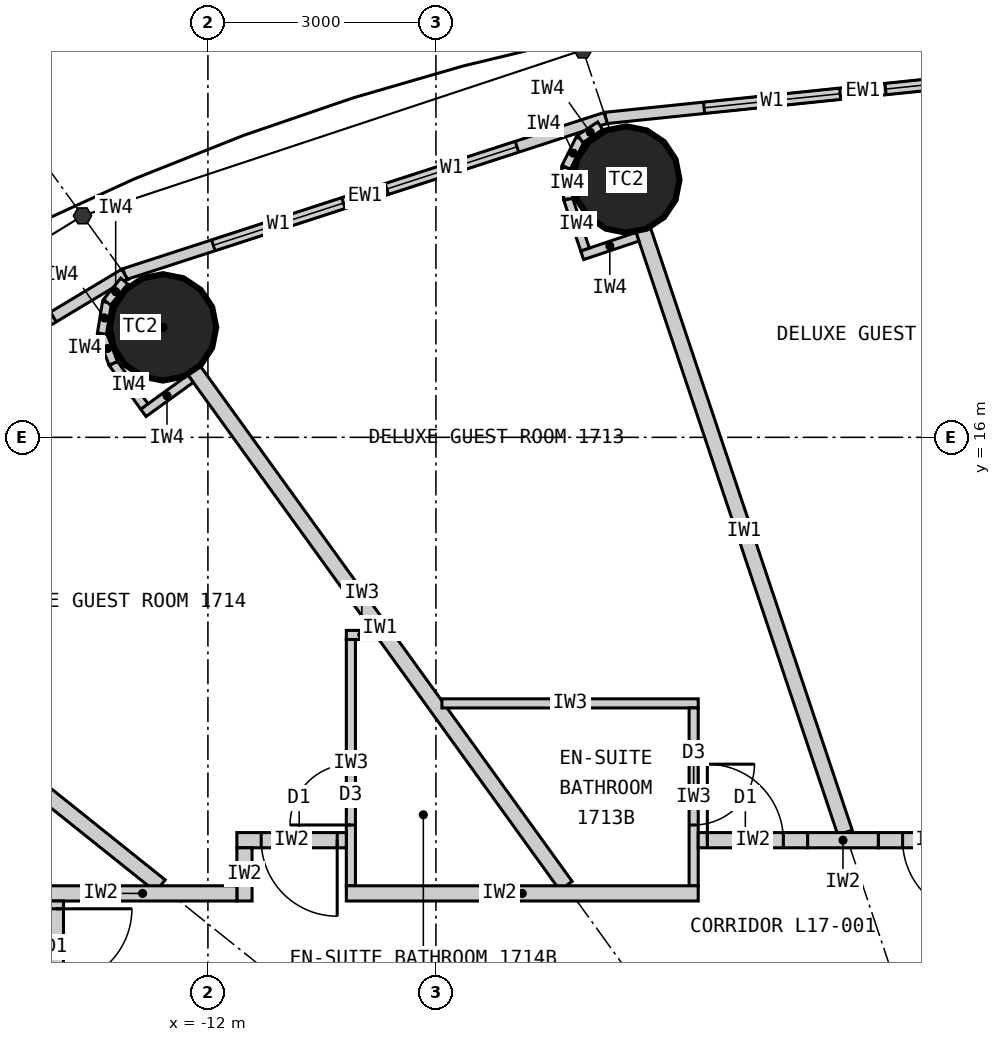
"""IFC4 building model, lengths in metres.
Left out: names, types, materials, properties, quantities, classifications, styles, units other than length and angle.
Written with IfcOpenShell. Run it as: python <this file> out.ifc"""

import sys

from ifc_helpers import new_model, si_unit, direction, frame, frame_2d, origin, origin_2d, place, context, subcontext, project, spatial, rectangle, circle, extrude, element, fill, save


model = new_model("IFC4")
c1 = context("Model", 3, precision=1e-05, world=origin(), true_north=direction((0.0, 1.0)))
c2 = subcontext(c1, "Body", "Model", "MODEL_VIEW")
j1 = project(units=[si_unit("LENGTHUNIT", "METRE"), si_unit("PLANEANGLEUNIT", "RADIAN")], contexts=[c1])
p1 = place(None, origin())
s1 = spatial("IfcSite", under=j1, at=p1, CompositionType="ELEMENT")
p2 = place(p1, origin())
s2 = spatial("IfcBuilding", under=s1, at=p2, CompositionType="ELEMENT")
p3 = place(p2, frame((0.0, 0.0, 70.5)))
s3 = spatial("IfcBuildingStorey", under=s2, at=p3, CompositionType="ELEMENT", Elevation=70.5)
for number, where, z_axis, x_axis in (
    (1, (-6.495, 19.391, 0.0), (0.0, 0.0, 1.0), (1.0, 0.0, 0.0)),
    (2, (-12.591, 17.447, 0.0), (0.0, 0.0, 1.0), (1.0, 0.0, 0.0)),
):
    element("IfcColumn", number, at=place(p3, frame(where, z_axis=z_axis, x_axis=x_axis)), inside=s3, PredefinedType="COLUMN", context=c2, shape_type="SweptSolid", body=[
        extrude(circle(Radius=0.7, at=origin_2d()), origin(), (0.0, 0.0, 1.0), 3.3),
    ])
p4 = place(p3, frame((0.0, 20.9, 0.0), z_axis=(0.0, 0.0, 1.0), x_axis=(-0.994721394369, -0.102612609291, 0.0)))
e3 = element("IfcWall", 3, at=p4, inside=s3, PredefinedType="ELEMENTEDWALL", context=c2, shape_type="SweptSolid", body=[
    extrude(rectangle(XDim=6.802, YDim=0.15, at=frame_2d((3.401, 0.0))), origin(), (0.0, 0.0, 1.0), 3.12),
])
p5 = place(p4, frame((1.301, 0.0, 0.9)))
e4 = element("IfcOpeningElement", 4, at=p5, cuts=e3, PredefinedType="OPENING", context=c2, shape_type="SweptSolid", body=[
    extrude(rectangle(XDim=1.8, YDim=1.9, at=frame_2d((0.9, 0.95))), frame((0.0, 0.085, 0.0), z_axis=(0.0, -1.0, 0.0), x_axis=(1.0, 0.0, 0.0)), (0.0, 0.0, 1.0), 0.17),
])
p6 = place(p4, frame((3.701, 0.0, 0.9)))
e5 = element("IfcOpeningElement", 5, at=p6, cuts=e3, PredefinedType="OPENING", context=c2, shape_type="SweptSolid", body=[
    extrude(rectangle(XDim=1.8, YDim=1.9, at=frame_2d((0.9, 0.95))), frame((0.0, 0.085, 0.0), z_axis=(0.0, -1.0, 0.0), x_axis=(1.0, 0.0, 0.0)), (0.0, 0.0, 1.0), 0.17),
])
p7 = place(p3, frame((-6.766, 20.202, 0.0), z_axis=(0.0, 0.0, 1.0), x_axis=(-0.951137534625, -0.308767534285, 0.0)))
e6 = element("IfcWall", 6, at=p7, inside=s3, PredefinedType="ELEMENTEDWALL", context=c2, shape_type="SweptSolid", body=[
    extrude(rectangle(XDim=6.655, YDim=0.15, at=frame_2d((3.328, 0.0))), origin(), (0.0, 0.0, 1.0), 3.12),
])
p8 = place(p7, frame((1.228, 0.0, 0.9)))
e7 = element("IfcOpeningElement", 7, at=p8, cuts=e6, PredefinedType="OPENING", context=c2, shape_type="SweptSolid", body=[
    extrude(rectangle(XDim=1.8, YDim=1.9, at=frame_2d((0.9, 0.95))), frame((0.0, 0.085, 0.0), z_axis=(0.0, -1.0, 0.0), x_axis=(1.0, 0.0, 0.0)), (0.0, 0.0, 1.0), 0.17),
])
p9 = place(p7, frame((3.628, 0.0, 0.9)))
e8 = element("IfcOpeningElement", 8, at=p9, cuts=e6, PredefinedType="OPENING", context=c2, shape_type="SweptSolid", body=[
    extrude(rectangle(XDim=1.8, YDim=1.9, at=frame_2d((0.9, 0.95))), frame((0.0, 0.085, 0.0), z_axis=(0.0, -1.0, 0.0), x_axis=(1.0, 0.0, 0.0)), (0.0, 0.0, 1.0), 0.17),
])
p10 = place(p3, frame((-13.096, 18.147, 0.0), z_axis=(0.0, 0.0, 1.0), x_axis=(-0.856983180864, -0.515344377787, 0.0)))
e9 = element("IfcWall", 9, at=p10, inside=s3, PredefinedType="ELEMENTEDWALL", context=c2, shape_type="SweptSolid", body=[
    extrude(rectangle(XDim=6.386, YDim=0.15, at=frame_2d((3.193, 0.0))), origin(), (0.0, 0.0, 1.0), 3.12),
])
p11 = place(p10, frame((1.093, 0.0, 0.9)))
e10 = element("IfcOpeningElement", 10, at=p11, cuts=e9, PredefinedType="OPENING", context=c2, shape_type="SweptSolid", body=[
    extrude(rectangle(XDim=1.8, YDim=1.9, at=frame_2d((0.9, 0.95))), frame((0.0, 0.085, 0.0), z_axis=(0.0, -1.0, 0.0), x_axis=(1.0, 0.0, 0.0)), (0.0, 0.0, 1.0), 0.17),
])
p12 = place(p10, frame((3.493, 0.0, 0.9)))
e11 = element("IfcOpeningElement", 11, at=p12, cuts=e9, PredefinedType="OPENING", context=c2, shape_type="SweptSolid", body=[
    extrude(rectangle(XDim=1.8, YDim=1.9, at=frame_2d((0.9, 0.95))), frame((0.0, 0.085, 0.0), z_axis=(0.0, -1.0, 0.0), x_axis=(1.0, 0.0, 0.0)), (0.0, 0.0, 1.0), 0.17),
])
p13 = place(p3, frame((-3.617, 10.8, 0.0), z_axis=(0.0, 0.0, 1.0), x_axis=(-0.317576599239, 0.948232621046, 0.0)))
e12 = element("IfcWall", 12, at=p13, inside=s3, PredefinedType="PARTITIONING", context=c2, shape_type="SweptSolid", body=[
    extrude(rectangle(XDim=8.36, YDim=0.2, at=frame_2d((4.18, 0.0))), origin(), (0.0, 0.0, 1.0), 2.32),
])
p14 = place(p3, frame((-7.289, 10.1, 0.0), z_axis=(0.0, 0.0, 1.0), x_axis=(-0.585198353053, 0.810890182197, 0.0)))
e13 = element("IfcWall", 13, at=p14, inside=s3, PredefinedType="PARTITIONING", context=c2, shape_type="SweptSolid", body=[
    extrude(rectangle(XDim=8.36, YDim=0.2, at=frame_2d((4.18, 0.0))), origin(), (0.0, 0.0, 1.0), 2.32),
])
p15 = place(p3, frame((-12.625, 10.1, 0.0), z_axis=(0.0, 0.0, 1.0), x_axis=(-0.780892451574, 0.624665493744, 0.0)))
e14 = element("IfcWall", 14, at=p15, inside=s3, PredefinedType="PARTITIONING", context=c2, shape_type="SweptSolid", body=[
    extrude(rectangle(XDim=6.045, YDim=0.2, at=frame_2d((3.022, 0.0))), origin(), (0.0, 0.0, 1.0), 2.32),
])
p16 = place(p3, frame((-8.921, 12.5, 0.0), z_axis=(0.0, 0.0, 1.0), x_axis=(1.0, 0.0, 0.0)))
e15 = element("IfcWall", 15, at=p16, inside=s3, PredefinedType="PARTITIONING", context=c2, shape_type="SweptSolid", body=[
    extrude(rectangle(XDim=3.372, YDim=0.12, at=frame_2d((1.686, 0.0))), origin(), (0.0, 0.0, 1.0), 3.12),
])
p17 = place(p3, frame((-5.609, 10.1, 0.0), z_axis=(0.0, 0.0, 1.0), x_axis=(0.0, 1.0, 0.0)))
e16 = element("IfcWall", 16, at=p17, inside=s3, PredefinedType="PARTITIONING", context=c2, shape_type="SweptSolid", body=[
    extrude(rectangle(XDim=2.34, YDim=0.12, at=frame_2d((1.17, 0.0))), origin(), (0.0, 0.0, 1.0), 3.12),
])
p18 = place(p17, frame((0.8, 0.0, 0.0)))
e17 = element("IfcOpeningElement", 17, at=p18, cuts=e16, PredefinedType="OPENING", context=c2, shape_type="SweptSolid", body=[
    extrude(rectangle(XDim=0.8, YDim=2.1, at=frame_2d((0.4, 1.05))), frame((0.0, 0.07, 0.0), z_axis=(0.0, -1.0, 0.0), x_axis=(1.0, 0.0, 0.0)), (0.0, 0.0, 1.0), 0.14),
])
p19 = place(p3, frame((-9.771, 13.4, 0.0), z_axis=(0.0, 0.0, 1.0), x_axis=(-1.0, 0.0, 0.0)))
e18 = element("IfcWall", 18, at=p19, inside=s3, PredefinedType="PARTITIONING", context=c2, shape_type="SweptSolid", body=[
    extrude(rectangle(XDim=0.408, YDim=0.12, at=frame_2d((0.204, 0.0))), origin(), (0.0, 0.0, 1.0), 3.12),
])
p20 = place(p3, frame((-10.119, 10.1, 0.0), z_axis=(0.0, 0.0, 1.0), x_axis=(0.0, 1.0, 0.0)))
e19 = element("IfcWall", 19, at=p20, inside=s3, PredefinedType="PARTITIONING", context=c2, shape_type="SweptSolid", body=[
    extrude(rectangle(XDim=3.24, YDim=0.12, at=frame_2d((1.62, 0.0))), origin(), (0.0, 0.0, 1.0), 3.12),
])
p21 = place(p20, frame((0.8, 0.0, 0.0)))
e20 = element("IfcOpeningElement", 20, at=p21, cuts=e19, PredefinedType="OPENING", context=c2, shape_type="SweptSolid", body=[
    extrude(rectangle(XDim=0.8, YDim=2.1, at=frame_2d((0.4, 1.05))), frame((0.0, 0.07, 0.0), z_axis=(0.0, -1.0, 0.0), x_axis=(1.0, 0.0, 0.0)), (0.0, 0.0, 1.0), 0.14),
])
p22 = place(p3, frame((-3.18, 10.7, 0.0), z_axis=(0.0, 0.0, 1.0), x_axis=(1.0, 0.0, 0.0)))
e21 = element("IfcWall", 21, at=p22, inside=s3, PredefinedType="PARTITIONING", context=c2, shape_type="SweptSolid", body=[
    extrude(rectangle(XDim=1.44, YDim=0.2, at=frame_2d((0.72, 0.0))), origin(), (0.0, 0.0, 1.0), 3.12),
])
p23 = place(p22, frame((0.32, 0.0, 0.0)))
e22 = element("IfcOpeningElement", 22, at=p23, cuts=e21, PredefinedType="OPENING", context=c2, shape_type="SweptSolid", body=[
    extrude(rectangle(XDim=1.0, YDim=2.2, at=frame_2d((0.5, 1.1))), frame((0.0, 0.11, 0.0), z_axis=(0.0, -1.0, 0.0), x_axis=(1.0, 0.0, 0.0)), (0.0, 0.0, 1.0), 0.22),
])
p24 = place(p3, frame((-5.549, 10.7, 0.0), z_axis=(0.0, 0.0, 1.0), x_axis=(1.0, 0.0, 0.0)))
e23 = element("IfcWall", 23, at=p24, inside=s3, PredefinedType="PARTITIONING", context=c2, shape_type="SweptSolid", body=[
    extrude(rectangle(XDim=1.44, YDim=0.2, at=frame_2d((0.72, 0.0))), origin(), (0.0, 0.0, 1.0), 3.12),
])
p25 = place(p24, frame((0.12, 0.0, 0.0)))
e24 = element("IfcOpeningElement", 24, at=p25, cuts=e23, PredefinedType="OPENING", context=c2, shape_type="SweptSolid", body=[
    extrude(rectangle(XDim=1.0, YDim=2.2, at=frame_2d((0.5, 1.1))), frame((0.0, 0.11, 0.0), z_axis=(0.0, -1.0, 0.0), x_axis=(1.0, 0.0, 0.0)), (0.0, 0.0, 1.0), 0.22),
])
p26 = place(p3, frame((-11.619, 10.7, 0.0), z_axis=(0.0, 0.0, 1.0), x_axis=(1.0, 0.0, 0.0)))
e25 = element("IfcWall", 25, at=p26, inside=s3, PredefinedType="PARTITIONING", context=c2, shape_type="SweptSolid", body=[
    extrude(rectangle(XDim=1.44, YDim=0.2, at=frame_2d((0.72, 0.0))), origin(), (0.0, 0.0, 1.0), 3.12),
])
p27 = place(p26, frame((0.32, 0.0, 0.0)))
e26 = element("IfcOpeningElement", 26, at=p27, cuts=e25, PredefinedType="OPENING", context=c2, shape_type="SweptSolid", body=[
    extrude(rectangle(XDim=1.0, YDim=2.2, at=frame_2d((0.5, 1.1))), frame((0.0, 0.11, 0.0), z_axis=(0.0, -1.0, 0.0), x_axis=(1.0, 0.0, 0.0)), (0.0, 0.0, 1.0), 0.22),
])
p28 = place(p3, frame((-11.519, 9.9, 0.0), z_axis=(0.0, 0.0, 1.0), x_axis=(0.0, 1.0, 0.0)))
e27 = element("IfcWall", 27, at=p28, inside=s3, PredefinedType="PARTITIONING", context=c2, shape_type="SweptSolid", body=[
    extrude(rectangle(XDim=0.7, YDim=0.2, at=frame_2d((0.35, 0.0))), origin(), (0.0, 0.0, 1.0), 3.12),
])
p29 = place(p3, frame((-4.109, 10.7, 0.0), z_axis=(0.0, 0.0, 1.0), x_axis=(1.0, 0.0, 0.0)))
e28 = element("IfcWall", 28, at=p29, inside=s3, PredefinedType="PARTITIONING", context=c2, shape_type="SweptSolid", body=[
    extrude(rectangle(XDim=0.929, YDim=0.2, at=frame_2d((0.465, 0.0))), origin(), (0.0, 0.0, 1.0), 3.12),
])
p30 = place(p3, frame((-14.1, 10.0, 0.0), z_axis=(0.0, 0.0, 1.0), x_axis=(1.0, 0.0, 0.0)))
e29 = element("IfcWall", 29, at=p30, inside=s3, PredefinedType="PARTITIONING", context=c2, shape_type="SweptSolid", body=[
    extrude(rectangle(XDim=2.481, YDim=0.2, at=frame_2d((1.24, 0.0))), origin(), (0.0, 0.0, 1.0), 3.12),
])
p31 = place(p3, frame((-10.179, 10.0, 0.0), z_axis=(0.0, 0.0, 1.0), x_axis=(1.0, 0.0, 0.0)))
e30 = element("IfcWall", 30, at=p31, inside=s3, PredefinedType="PARTITIONING", context=c2, shape_type="SweptSolid", body=[
    extrude(rectangle(XDim=4.63, YDim=0.2, at=frame_2d((2.315, 0.0))), origin(), (0.0, 0.0, 1.0), 3.12),
])
p32 = place(p3, frame((-14.0, 9.9, 0.0), z_axis=(0.0, 0.0, 1.0), x_axis=(0.0, -1.0, 0.0)))
e31 = element("IfcWall", 31, at=p32, inside=s3, PredefinedType="PARTITIONING", context=c2, shape_type="SweptSolid", body=[
    extrude(rectangle(XDim=5.127, YDim=0.2, at=frame_2d((2.564, 0.0))), origin(), (0.0, 0.0, 1.0), 3.12),
])
p33 = place(p32, frame((0.103, 0.0, 0.0)))
e32 = element("IfcOpeningElement", 32, at=p33, cuts=e31, PredefinedType="OPENING", context=c2, shape_type="SweptSolid", body=[
    extrude(rectangle(XDim=1.0, YDim=2.2, at=frame_2d((0.5, 1.1))), frame((0.0, 0.11, 0.0), z_axis=(0.0, -1.0, 0.0), x_axis=(1.0, 0.0, 0.0)), (0.0, 0.0, 1.0), 0.22),
])
p34 = place(p3, frame((-6.348, 18.639, 0.0), z_axis=(0.0, 0.0, 1.0), x_axis=(-0.948268951266, -0.317468102437, 0.0)))
e33 = element("IfcWall", 33, at=p34, inside=s3, PredefinedType="PARTITIONING", context=c2, shape_type="SweptSolid", body=[
    extrude(rectangle(XDim=0.768, YDim=0.12, at=frame_2d((0.384, 0.0))), origin(), (0.0, 0.0, 1.0), 3.12),
])
p35 = place(p3, frame((-7.038, 18.471, 0.0), z_axis=(0.0, 0.0, 1.0), x_axis=(-0.317378466199, 0.9482989556, 0.0)))
e34 = element("IfcWall", 34, at=p35, inside=s3, PredefinedType="PARTITIONING", context=c2, shape_type="SweptSolid", body=[
    extrude(rectangle(XDim=0.7, YDim=0.12, at=frame_2d((0.35, 0.0))), origin(), (0.0, 0.0, 1.0), 3.12),
])
p36 = place(p3, frame((-7.26, 19.135, 0.0), z_axis=(0.0, 0.0, 1.0), x_axis=(-0.0613238046, 0.99811792439, 0.0)))
e35 = element("IfcWall", 35, at=p36, inside=s3, PredefinedType="PARTITIONING", context=c2, shape_type="SweptSolid", body=[
    extrude(rectangle(XDim=0.418, YDim=0.12, at=frame_2d((0.209, 0.0))), origin(), (0.0, 0.0, 1.0), 3.12),
])
p37 = place(p3, frame((-7.286, 19.552, 0.0), z_axis=(0.0, 0.0, 1.0), x_axis=(0.445810757773, 0.89512723579, 0.0)))
e36 = element("IfcWall", 36, at=p37, inside=s3, PredefinedType="PARTITIONING", context=c2, shape_type="SweptSolid", body=[
    extrude(rectangle(XDim=0.418, YDim=0.12, at=frame_2d((0.209, 0.0))), origin(), (0.0, 0.0, 1.0), 3.12),
])
p38 = place(p3, frame((-7.1, 19.926, 0.0), z_axis=(0.0, 0.0, 1.0), x_axis=(0.833488262509, 0.552537162787, 0.0)))
e37 = element("IfcWall", 37, at=p38, inside=s3, PredefinedType="PARTITIONING", context=c2, shape_type="SweptSolid", body=[
    extrude(rectangle(XDim=0.313, YDim=0.12, at=frame_2d((0.156, 0.0))), origin(), (0.0, 0.0, 1.0), 3.12),
])
p39 = place(p3, frame((-12.227, 16.772, 0.0), z_axis=(0.0, 0.0, 1.0), x_axis=(-0.810821798253, -0.585293098778, 0.0)))
e38 = element("IfcWall", 38, at=p39, inside=s3, PredefinedType="PARTITIONING", context=c2, shape_type="SweptSolid", body=[
    extrude(rectangle(XDim=0.768, YDim=0.12, at=frame_2d((0.384, 0.0))), origin(), (0.0, 0.0, 1.0), 3.12),
])
p40 = place(p3, frame((-12.836, 16.406, 0.0), z_axis=(0.0, 0.0, 1.0), x_axis=(-0.585223113993, 0.810872312296, 0.0)))
e39 = element("IfcWall", 39, at=p40, inside=s3, PredefinedType="PARTITIONING", context=c2, shape_type="SweptSolid", body=[
    extrude(rectangle(XDim=0.7, YDim=0.12, at=frame_2d((0.35, 0.0))), origin(), (0.0, 0.0, 1.0), 3.12),
])
p41 = place(p3, frame((-13.246, 16.974, 0.0), z_axis=(0.0, 0.0, 1.0), x_axis=(-0.355728122235, 0.934589483705, 0.0)))
e40 = element("IfcWall", 40, at=p41, inside=s3, PredefinedType="PARTITIONING", context=c2, shape_type="SweptSolid", body=[
    extrude(rectangle(XDim=0.418, YDim=0.12, at=frame_2d((0.209, 0.0))), origin(), (0.0, 0.0, 1.0), 3.12),
])
p42 = place(p3, frame((-13.394, 17.365, 0.0), z_axis=(0.0, 0.0, 1.0), x_axis=(0.159379276926, 0.987217425943, 0.0)))
e41 = element("IfcWall", 41, at=p42, inside=s3, PredefinedType="PARTITIONING", context=c2, shape_type="SweptSolid", body=[
    extrude(rectangle(XDim=0.418, YDim=0.12, at=frame_2d((0.209, 0.0))), origin(), (0.0, 0.0, 1.0), 3.12),
])
p43 = place(p3, frame((-13.328, 17.777, 0.0), z_axis=(0.0, 0.0, 1.0), x_axis=(0.632276783541, 0.774742582407, 0.0)))
e42 = element("IfcWall", 42, at=p43, inside=s3, PredefinedType="PARTITIONING", context=c2, shape_type="SweptSolid", body=[
    extrude(rectangle(XDim=0.36, YDim=0.12, at=frame_2d((0.18, 0.0))), origin(), (0.0, 0.0, 1.0), 3.12),
])
p44 = place(p5, origin())
e43 = element("IfcWindow", 43, at=p44, inside=s3, PartitioningType="SINGLE_PANEL", PredefinedType="WINDOW", context=c2, shape_type="SweptSolid", body=[
    extrude(rectangle(XDim=1.8, YDim=1.9, at=frame_2d((0.9, 0.95))), frame((0.0, 0.03, 0.0), z_axis=(0.0, -1.0, 0.0), x_axis=(1.0, 0.0, 0.0)), (0.0, 0.0, 1.0), 0.06),
])
fill(e4, e43)
p45 = place(p6, origin())
e44 = element("IfcWindow", 44, at=p45, inside=s3, PartitioningType="SINGLE_PANEL", PredefinedType="WINDOW", context=c2, shape_type="SweptSolid", body=[
    extrude(rectangle(XDim=1.8, YDim=1.9, at=frame_2d((0.9, 0.95))), frame((0.0, 0.03, 0.0), z_axis=(0.0, -1.0, 0.0), x_axis=(1.0, 0.0, 0.0)), (0.0, 0.0, 1.0), 0.06),
])
fill(e5, e44)
p46 = place(p8, origin())
e45 = element("IfcWindow", 45, at=p46, inside=s3, PartitioningType="SINGLE_PANEL", PredefinedType="WINDOW", context=c2, shape_type="SweptSolid", body=[
    extrude(rectangle(XDim=1.8, YDim=1.9, at=frame_2d((0.9, 0.95))), frame((0.0, 0.03, 0.0), z_axis=(0.0, -1.0, 0.0), x_axis=(1.0, 0.0, 0.0)), (0.0, 0.0, 1.0), 0.06),
])
fill(e7, e45)
p47 = place(p9, origin())
e46 = element("IfcWindow", 46, at=p47, inside=s3, PartitioningType="SINGLE_PANEL", PredefinedType="WINDOW", context=c2, shape_type="SweptSolid", body=[
    extrude(rectangle(XDim=1.8, YDim=1.9, at=frame_2d((0.9, 0.95))), frame((0.0, 0.03, 0.0), z_axis=(0.0, -1.0, 0.0), x_axis=(1.0, 0.0, 0.0)), (0.0, 0.0, 1.0), 0.06),
])
fill(e8, e46)
p48 = place(p11, origin())
e47 = element("IfcWindow", 47, at=p48, inside=s3, PartitioningType="SINGLE_PANEL", PredefinedType="WINDOW", context=c2, shape_type="SweptSolid", body=[
    extrude(rectangle(XDim=1.8, YDim=1.9, at=frame_2d((0.9, 0.95))), frame((0.0, 0.03, 0.0), z_axis=(0.0, -1.0, 0.0), x_axis=(1.0, 0.0, 0.0)), (0.0, 0.0, 1.0), 0.06),
])
fill(e10, e47)
p49 = place(p23, origin())
e48 = element("IfcDoor", 48, at=p49, inside=s3, OperationType="SINGLE_SWING_RIGHT", PredefinedType="DOOR", context=c2, shape_type="SweptSolid", body=[
    extrude(rectangle(XDim=1.0, YDim=2.2, at=frame_2d((0.5, 1.1))), frame((0.0, 0.025, 0.0), z_axis=(0.0, -1.0, 0.0), x_axis=(1.0, 0.0, 0.0)), (0.0, 0.0, 1.0), 0.05),
])
fill(e22, e48)
p50 = place(p18, origin())
e49 = element("IfcDoor", 49, at=p50, inside=s3, OperationType="SINGLE_SWING_RIGHT", PredefinedType="DOOR", context=c2, shape_type="SweptSolid", body=[
    extrude(rectangle(XDim=0.8, YDim=2.1, at=frame_2d((0.4, 1.05))), frame((0.0, 0.025, 0.0), z_axis=(0.0, -1.0, 0.0), x_axis=(1.0, 0.0, 0.0)), (0.0, 0.0, 1.0), 0.05),
])
fill(e17, e49)
p51 = place(p25, origin())
e50 = element("IfcDoor", 50, at=p51, inside=s3, OperationType="SINGLE_SWING_LEFT", PredefinedType="DOOR", context=c2, shape_type="SweptSolid", body=[
    extrude(rectangle(XDim=1.0, YDim=2.2, at=frame_2d((0.5, 1.1))), frame((0.0, 0.025, 0.0), z_axis=(0.0, -1.0, 0.0), x_axis=(1.0, 0.0, 0.0)), (0.0, 0.0, 1.0), 0.05),
])
fill(e24, e50)
p52 = place(p21, origin())
e51 = element("IfcDoor", 51, at=p52, inside=s3, OperationType="SINGLE_SWING_LEFT", PredefinedType="DOOR", context=c2, shape_type="SweptSolid", body=[
    extrude(rectangle(XDim=0.8, YDim=2.1, at=frame_2d((0.4, 1.05))), frame((0.0, 0.025, 0.0), z_axis=(0.0, -1.0, 0.0), x_axis=(1.0, 0.0, 0.0)), (0.0, 0.0, 1.0), 0.05),
])
fill(e20, e51)
p53 = place(p27, origin())
e52 = element("IfcDoor", 52, at=p53, inside=s3, OperationType="SINGLE_SWING_RIGHT", PredefinedType="DOOR", context=c2, shape_type="SweptSolid", body=[
    extrude(rectangle(XDim=1.0, YDim=2.2, at=frame_2d((0.5, 1.1))), frame((0.0, 0.025, 0.0), z_axis=(0.0, -1.0, 0.0), x_axis=(1.0, 0.0, 0.0)), (0.0, 0.0, 1.0), 0.05),
])
fill(e26, e52)
p54 = place(p33, origin())
e53 = element("IfcDoor", 53, at=p54, inside=s3, OperationType="SINGLE_SWING_LEFT", PredefinedType="DOOR", context=c2, shape_type="SweptSolid", body=[
    extrude(rectangle(XDim=1.0, YDim=2.2, at=frame_2d((0.5, 1.1))), frame((0.0, 0.025, 0.0), z_axis=(0.0, -1.0, 0.0), x_axis=(1.0, 0.0, 0.0)), (0.0, 0.0, 1.0), 0.05),
])
fill(e32, e53)
save(model, sys.argv[1])
